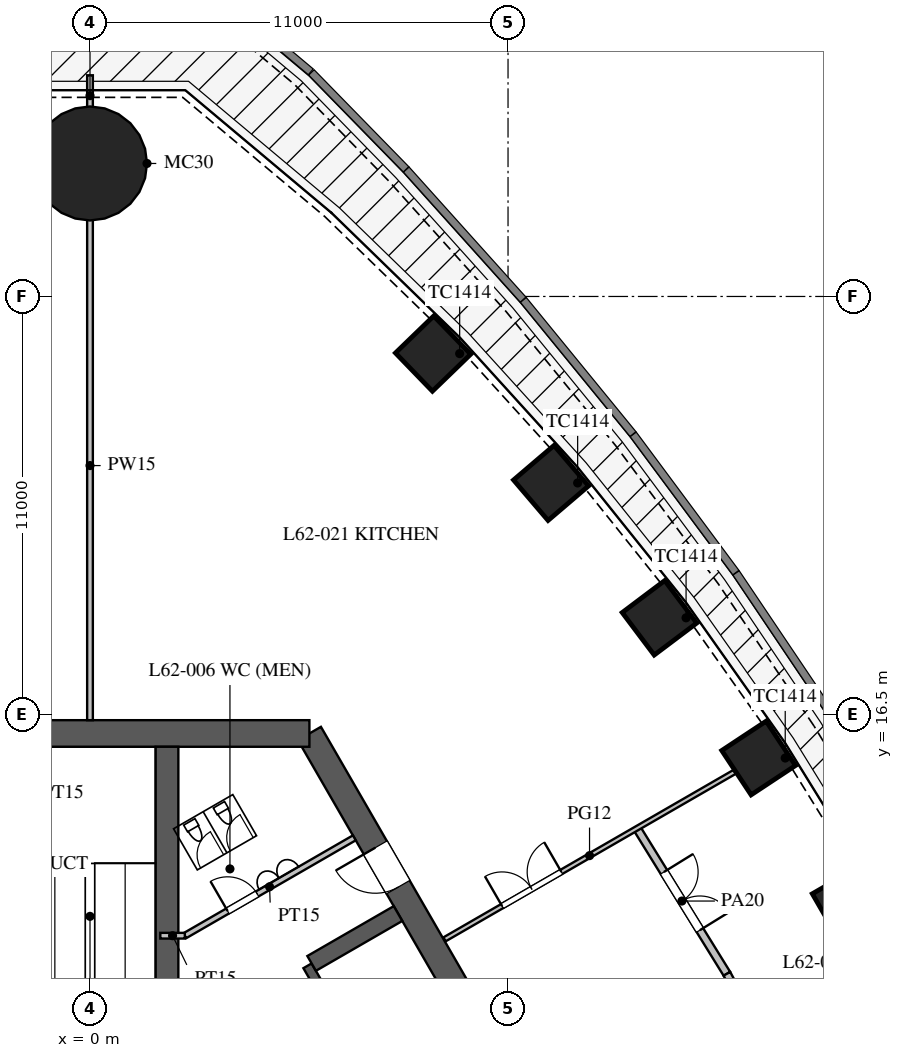
"""IFC4 building model, lengths in metres.
Left out: names, types, materials, properties, quantities, classifications, styles, units other than length and angle.
Written with IfcOpenShell. Run it as: python <this file> out.ifc"""

import sys

from ifc_helpers import new_model, si_unit, direction, frame, frame_2d, origin, origin_2d, place, context, subcontext, project, spatial, rectangle, circle, extrude, element, fill, save


model = new_model("IFC4")
c1 = context("Model", 3, precision=1e-05, world=origin(), true_north=direction((0.0, 1.0)))
c2 = subcontext(c1, "Body", "Model", "MODEL_VIEW")
j1 = project(units=[si_unit("LENGTHUNIT", "METRE"), si_unit("PLANEANGLEUNIT", "RADIAN")], contexts=[c1])
p1 = place(None, origin())
s1 = spatial("IfcSite", under=j1, at=p1, CompositionType="ELEMENT")
p2 = place(p1, origin())
s2 = spatial("IfcBuilding", under=s1, at=p2, CompositionType="ELEMENT")
p3 = place(p2, frame((0.0, 0.0, 271.3)))
s3 = spatial("IfcBuildingStorey", under=s2, at=p3, CompositionType="ELEMENT", Elevation=271.3)
for number, where, z_axis, x_axis in (
    (1, (19.963, 11.526, 0.0), (0.0, 0.0, 1.0), (-0.5, 0.866, 0.0)),
    (2, (17.594, 15.354, 0.0), (0.0, 0.0, 1.0), (-0.552, 0.834, 0.0)),
    (3, (14.985, 19.044, 0.0), (0.0, 0.0, 1.0), (-0.601, 0.799, 0.0)),
    (4, (12.132, 22.593, 0.0), (0.0, 0.0, 1.0), (-0.649, 0.761, 0.0)),
    (5, (9.027, 25.997, 0.0), (0.0, 0.0, 1.0), (-0.695, 0.719, 0.0)),
):
    element("IfcColumn", number, at=place(p3, frame(where, z_axis=z_axis, x_axis=x_axis)), inside=s3, PredefinedType="COLUMN", context=c2, shape_type="SweptSolid", body=[
        extrude(rectangle(XDim=1.4, YDim=1.4, at=origin_2d()), origin(), (0.0, 0.0, 1.0), 5.0),
    ])
p4 = place(p3, frame((0.0, 31.0, 0.0), z_axis=(0.0, 0.0, 1.0), x_axis=(1.0, 0.0, 0.0)))
e6 = element("IfcColumn", 6, at=p4, inside=s3, PredefinedType="COLUMN", context=c2, shape_type="SweptSolid", body=[
    extrude(circle(Radius=1.5, at=origin_2d()), origin(), (0.0, 0.0, 1.0), 5.0),
])
p5 = place(p3, frame((16.743, -3.0, 0.0), z_axis=(0.0, 0.0, 1.0), x_axis=(-0.500002442456, 0.866023993627, 0.0)))
e7 = element("IfcWall", 7, at=p5, inside=s3, PredefinedType="SHEAR", context=c2, shape_type="SweptSolid", body=[
    extrude(rectangle(XDim=21.939, YDim=0.7, at=frame_2d((10.97, 0.0))), origin(), (0.0, 0.0, 1.0), 5.0),
])
p6 = place(p5, frame((17.27, 0.0, 0.0)))
e8 = element("IfcOpeningElement", 8, at=p6, cuts=e7, PredefinedType="OPENING", context=c2, shape_type="SweptSolid", body=[
    extrude(rectangle(XDim=1.2, YDim=2.1, at=frame_2d((0.6, 1.05))), frame((0.0, 0.36, 0.0), z_axis=(0.0, -1.0, 0.0), x_axis=(1.0, 0.0, 0.0)), (0.0, 0.0, 1.0), 0.72),
])
p7 = place(p5, frame((3.47, 0.0, 0.0)))
e9 = element("IfcOpeningElement", 9, at=p7, cuts=e7, PredefinedType="OPENING", context=c2, shape_type="SweptSolid", body=[
    extrude(rectangle(XDim=1.2, YDim=2.1, at=frame_2d((0.6, 1.05))), frame((0.0, 0.36, 0.0), z_axis=(0.0, -1.0, 0.0), x_axis=(1.0, 0.0, 0.0)), (0.0, 0.0, 1.0), 0.72),
])
p8 = place(p3, frame((5.773, 16.0, 0.0), z_axis=(0.0, 0.0, 1.0), x_axis=(-1.0, 0.0, 0.0)))
e10 = element("IfcWall", 10, at=p8, inside=s3, PredefinedType="SHEAR", context=c2, shape_type="SweptSolid", body=[
    extrude(rectangle(XDim=11.547, YDim=0.7, at=frame_2d((5.773, 0.0))), origin(), (0.0, 0.0, 1.0), 5.0),
])
p9 = place(p3, frame((11.424, 0.014, 0.0), z_axis=(0.0, 0.0, 1.0), x_axis=(-0.500001763848, 0.866024385424, 0.0)))
e11 = element("IfcWall", 11, at=p9, inside=s3, PredefinedType="SHEAR", context=c2, shape_type="SweptSolid", body=[
    extrude(rectangle(XDim=11.4, YDim=0.25, at=frame_2d((5.7, 0.0))), origin(), (0.0, 0.0, 1.0), 5.0),
])
p10 = place(p9, frame((0.975, 0.0, 0.0)))
e12 = element("IfcOpeningElement", 12, at=p10, cuts=e11, PredefinedType="OPENING", context=c2, shape_type="SweptSolid", body=[
    extrude(rectangle(XDim=0.9, YDim=2.1, at=frame_2d((0.45, 1.05))), frame((0.0, 0.135, 0.0), z_axis=(0.0, -1.0, 0.0), x_axis=(1.0, 0.0, 0.0)), (0.0, 0.0, 1.0), 0.27),
])
p11 = place(p9, frame((3.825, 0.0, 0.0)))
e13 = element("IfcOpeningElement", 13, at=p11, cuts=e11, PredefinedType="OPENING", context=c2, shape_type="SweptSolid", body=[
    extrude(rectangle(XDim=0.9, YDim=2.1, at=frame_2d((0.45, 1.05))), frame((0.0, 0.135, 0.0), z_axis=(0.0, -1.0, 0.0), x_axis=(1.0, 0.0, 0.0)), (0.0, 0.0, 1.0), 0.27),
])
p12 = place(p9, frame((6.675, 0.0, 0.0)))
e14 = element("IfcOpeningElement", 14, at=p12, cuts=e11, PredefinedType="OPENING", context=c2, shape_type="SweptSolid", body=[
    extrude(rectangle(XDim=0.9, YDim=2.1, at=frame_2d((0.45, 1.05))), frame((0.0, 0.135, 0.0), z_axis=(0.0, -1.0, 0.0), x_axis=(1.0, 0.0, 0.0)), (0.0, 0.0, 1.0), 0.27),
])
p13 = place(p9, frame((9.525, 0.0, 0.0)))
e15 = element("IfcOpeningElement", 15, at=p13, cuts=e11, PredefinedType="OPENING", context=c2, shape_type="SweptSolid", body=[
    extrude(rectangle(XDim=0.9, YDim=2.1, at=frame_2d((0.45, 1.05))), frame((0.0, 0.135, 0.0), z_axis=(0.0, -1.0, 0.0), x_axis=(1.0, 0.0, 0.0)), (0.0, 0.0, 1.0), 0.27),
])
p14 = place(p3, frame((5.832, 9.949, 0.0), z_axis=(0.0, 0.0, 1.0), x_axis=(0.866036909293, 0.499980071345, 0.0)))
e16 = element("IfcWall", 16, at=p14, inside=s3, PredefinedType="SHEAR", context=c2, shape_type="SweptSolid", body=[
    extrude(rectangle(XDim=2.625, YDim=0.45, at=frame_2d((1.312, 0.0))), origin(), (0.0, 0.0, 1.0), 5.0),
])
p15 = place(p3, frame((2.025, 6.525, 0.0), z_axis=(0.0, 0.0, 1.0), x_axis=(0.0, 1.0, 0.0)))
e17 = element("IfcWall", 17, at=p15, inside=s3, PredefinedType="SHEAR", context=c2, shape_type="SweptSolid", body=[
    extrude(rectangle(XDim=9.125, YDim=0.6, at=frame_2d((4.562, 0.0))), origin(), (0.0, 0.0, 1.0), 5.0),
])
p16 = place(p3, frame((21.673, 12.513, 0.0), z_axis=(0.0, 0.0, 1.0), x_axis=(-0.519790350351, 0.85429385558, 0.0)))
e18 = element("IfcWall", 18, at=p16, inside=s3, PredefinedType="PARAPET", context=c2, shape_type="SweptSolid", body=[
    extrude(rectangle(XDim=4.501, YDim=0.25, at=frame_2d((2.25, 0.0))), origin(), (0.0, 0.0, 1.0), 1.1),
])
p17 = place(p3, frame((19.333, 16.358, 0.0), z_axis=(0.0, 0.0, 1.0), x_axis=(-0.55850386778, 0.829501916619, 0.0)))
e19 = element("IfcWall", 19, at=p17, inside=s3, PredefinedType="PARAPET", context=c2, shape_type="SweptSolid", body=[
    extrude(rectangle(XDim=4.511, YDim=0.25, at=frame_2d((2.255, 0.0))), origin(), (0.0, 0.0, 1.0), 1.1),
])
p18 = place(p3, frame((16.814, 20.1, 0.0), z_axis=(0.0, 0.0, 1.0), x_axis=(-0.59613842716, 0.802881669777, 0.0)))
e20 = element("IfcWall", 20, at=p18, inside=s3, PredefinedType="PARAPET", context=c2, shape_type="SweptSolid", body=[
    extrude(rectangle(XDim=4.53, YDim=0.25, at=frame_2d((2.265, 0.0))), origin(), (0.0, 0.0, 1.0), 1.1),
])
p19 = place(p3, frame((14.114, 23.737, 0.0), z_axis=(0.0, 0.0, 1.0), x_axis=(-0.632765292047, 0.774343647989, 0.0)))
e21 = element("IfcWall", 21, at=p19, inside=s3, PredefinedType="PARAPET", context=c2, shape_type="SweptSolid", body=[
    extrude(rectangle(XDim=4.559, YDim=0.25, at=frame_2d((2.28, 0.0))), origin(), (0.0, 0.0, 1.0), 1.1),
])
p20 = place(p3, frame((11.229, 27.267, 0.0), z_axis=(0.0, 0.0, 1.0), x_axis=(-0.668245909458, 0.743940457626, 0.0)))
e22 = element("IfcWall", 22, at=p20, inside=s3, PredefinedType="PARAPET", context=c2, shape_type="SweptSolid", body=[
    extrude(rectangle(XDim=4.599, YDim=0.25, at=frame_2d((2.3, 0.0))), origin(), (0.0, 0.0, 1.0), 1.1),
])
p21 = place(p3, frame((8.155, 30.689, 0.0), z_axis=(0.0, 0.0, 1.0), x_axis=(-0.698630261643, 0.715482884154, 0.0)))
e23 = element("IfcWall", 23, at=p21, inside=s3, PredefinedType="PARAPET", context=c2, shape_type="SweptSolid", body=[
    extrude(rectangle(XDim=3.564, YDim=0.25, at=frame_2d((1.782, 0.0))), origin(), (0.0, 0.0, 1.0), 1.1),
])
p22 = place(p3, frame((5.665, 33.239, 0.0), z_axis=(0.0, 0.0, 1.0), x_axis=(-0.766065878984, 0.642762062553, 0.0)))
e24 = element("IfcWall", 24, at=p22, inside=s3, PredefinedType="PARAPET", context=c2, shape_type="SweptSolid", body=[
    extrude(rectangle(XDim=4.475, YDim=0.25, at=frame_2d((2.237, 0.0))), origin(), (0.0, 0.0, 1.0), 1.1),
])
p23 = place(p3, frame((2.495, 10.678, 0.0), z_axis=(0.0, 0.0, 1.0), x_axis=(0.866037967349, 0.499978238636, 0.0)))
e25 = element("IfcWall", 25, at=p23, inside=s3, PredefinedType="PARTITIONING", context=c2, shape_type="SweptSolid", body=[
    extrude(rectangle(XDim=5.15, YDim=0.15, at=frame_2d((2.575, 0.0))), origin(), (0.0, 0.0, 1.0), 4.8),
])
p24 = place(p23, frame((1.3, 0.0, 0.0)))
e26 = element("IfcOpeningElement", 26, at=p24, cuts=e25, PredefinedType="OPENING", context=c2, shape_type="SweptSolid", body=[
    extrude(rectangle(XDim=0.9, YDim=2.1, at=frame_2d((0.45, 1.05))), frame((0.0, 0.085, 0.0), z_axis=(0.0, -1.0, 0.0), x_axis=(1.0, 0.0, 0.0)), (0.0, 0.0, 1.0), 0.17),
])
p25 = place(p3, frame((2.495, 10.678, 0.0), z_axis=(0.0, 0.0, 1.0), x_axis=(-1.0, 0.0, 0.0)))
e27 = element("IfcWall", 27, at=p25, inside=s3, PredefinedType="PARTITIONING", context=c2, shape_type="SweptSolid", body=[
    extrude(rectangle(XDim=0.645, YDim=0.15, at=frame_2d((0.323, 0.0))), origin(), (0.0, 0.0, 1.0), 4.8),
])
p26 = place(p3, frame((0.0, 16.35, 0.0), z_axis=(0.0, 0.0, 1.0), x_axis=(0.0, 1.0, 0.0)))
e28 = element("IfcWall", 28, at=p26, inside=s3, PredefinedType="PARTITIONING", context=c2, shape_type="SweptSolid", body=[
    extrude(rectangle(XDim=13.4, YDim=0.15, at=frame_2d((6.7, 0.0))), origin(), (0.0, 0.0, 1.0), 3.3),
])
p27 = place(p3, frame((0.0, 32.25, 0.0), z_axis=(0.0, 0.0, 1.0), x_axis=(0.0, 1.0, 0.0)))
e29 = element("IfcWall", 29, at=p27, inside=s3, PredefinedType="PARTITIONING", context=c2, shape_type="SweptSolid", body=[
    extrude(rectangle(XDim=1.07, YDim=0.15, at=frame_2d((0.535, 0.0))), origin(), (0.0, 0.0, 1.0), 3.3),
])
p28 = place(p3, frame((16.759, 9.676, 0.0), z_axis=(0.0, 0.0, 1.0), x_axis=(-0.525996140194, 0.850486954927, 0.0)))
e30 = element("IfcWall", 30, at=p28, inside=s3, PredefinedType="PARTITIONING", context=c2, shape_type="SweptSolid", body=[
    extrude(rectangle(XDim=4.502, YDim=0.2, at=frame_2d((2.251, 0.0))), origin(), (0.0, 0.0, 1.0), 3.6),
])
p29 = place(p28, frame((1.35, 0.0, 0.0)))
e31 = element("IfcOpeningElement", 31, at=p29, cuts=e30, PredefinedType="OPENING", context=c2, shape_type="SweptSolid", body=[
    extrude(rectangle(XDim=1.8, YDim=2.1, at=frame_2d((0.9, 1.05))), frame((0.0, 0.11, 0.0), z_axis=(0.0, -1.0, 0.0), x_axis=(1.0, 0.0, 0.0)), (0.0, 0.0, 1.0), 0.22),
])
p30 = place(p3, frame((18.891, 5.71, 0.0), z_axis=(0.0, 0.0, 1.0), x_axis=(-0.473524102582, 0.880780860529, 0.0)))
e32 = element("IfcWall", 32, at=p30, inside=s3, PredefinedType="PARTITIONING", context=c2, shape_type="SweptSolid", body=[
    extrude(rectangle(XDim=4.502, YDim=0.2, at=frame_2d((2.251, 0.0))), origin(), (0.0, 0.0, 1.0), 3.6),
])
p31 = place(p3, frame((9.329, 10.582, 0.0), z_axis=(0.0, 0.0, 1.0), x_axis=(0.86602503688, 0.500000635496, 0.0)))
e33 = element("IfcWall", 33, at=p31, inside=s3, PredefinedType="PARTITIONING", context=c2, shape_type="SweptSolid", body=[
    extrude(rectangle(XDim=8.812, YDim=0.12, at=frame_2d((4.406, 0.0))), origin(), (0.0, 0.0, 1.0), 3.4),
])
p32 = place(p31, frame((1.75, 0.0, 0.0)))
e34 = element("IfcOpeningElement", 34, at=p32, cuts=e33, PredefinedType="OPENING", context=c2, shape_type="SweptSolid", body=[
    extrude(rectangle(XDim=1.8, YDim=2.1, at=frame_2d((0.9, 1.05))), frame((0.0, 0.07, 0.0), z_axis=(0.0, -1.0, 0.0), x_axis=(1.0, 0.0, 0.0)), (0.0, 0.0, 1.0), 0.14),
])
p33 = place(p24, origin())
e35 = element("IfcDoor", 35, at=p33, inside=s3, OperationType="SINGLE_SWING_LEFT", PredefinedType="DOOR", context=c2, shape_type="SweptSolid", body=[
    extrude(rectangle(XDim=0.9, YDim=2.1, at=frame_2d((0.45, 1.05))), frame((0.0, 0.025, 0.0), z_axis=(0.0, -1.0, 0.0), x_axis=(1.0, 0.0, 0.0)), (0.0, 0.0, 1.0), 0.05),
])
fill(e26, e35)
p34 = place(p6, origin())
e36 = element("IfcDoor", 36, at=p34, inside=s3, OperationType="SINGLE_SWING_RIGHT", PredefinedType="DOOR", context=c2, shape_type="SweptSolid", body=[
    extrude(rectangle(XDim=1.2, YDim=2.1, at=frame_2d((0.6, 1.05))), frame((0.0, 0.025, 0.0), z_axis=(0.0, -1.0, 0.0), x_axis=(1.0, 0.0, 0.0)), (0.0, 0.0, 1.0), 0.05),
])
fill(e8, e36)
p35 = place(p32, origin())
e37 = element("IfcDoor", 37, at=p35, inside=s3, OperationType="DOUBLE_DOOR_SINGLE_SWING", PredefinedType="DOOR", context=c2, shape_type="SweptSolid", body=[
    extrude(rectangle(XDim=1.8, YDim=2.1, at=frame_2d((0.9, 1.05))), frame((0.0, 0.025, 0.0), z_axis=(0.0, -1.0, 0.0), x_axis=(1.0, 0.0, 0.0)), (0.0, 0.0, 1.0), 0.05),
])
fill(e34, e37)
p36 = place(p29, frame((1.8, 0.0, 0.0), z_axis=(0.0, 0.0, 1.0), x_axis=(-1.0, 0.0, 0.0)))
e38 = element("IfcDoor", 38, at=p36, inside=s3, OperationType="DOUBLE_DOOR_SINGLE_SWING", PredefinedType="DOOR", context=c2, shape_type="SweptSolid", body=[
    extrude(rectangle(XDim=1.8, YDim=2.1, at=frame_2d((0.9, 1.05))), frame((0.0, 0.025, 0.0), z_axis=(0.0, -1.0, 0.0), x_axis=(1.0, 0.0, 0.0)), (0.0, 0.0, 1.0), 0.05),
])
fill(e31, e38)
save(model, sys.argv[1])
